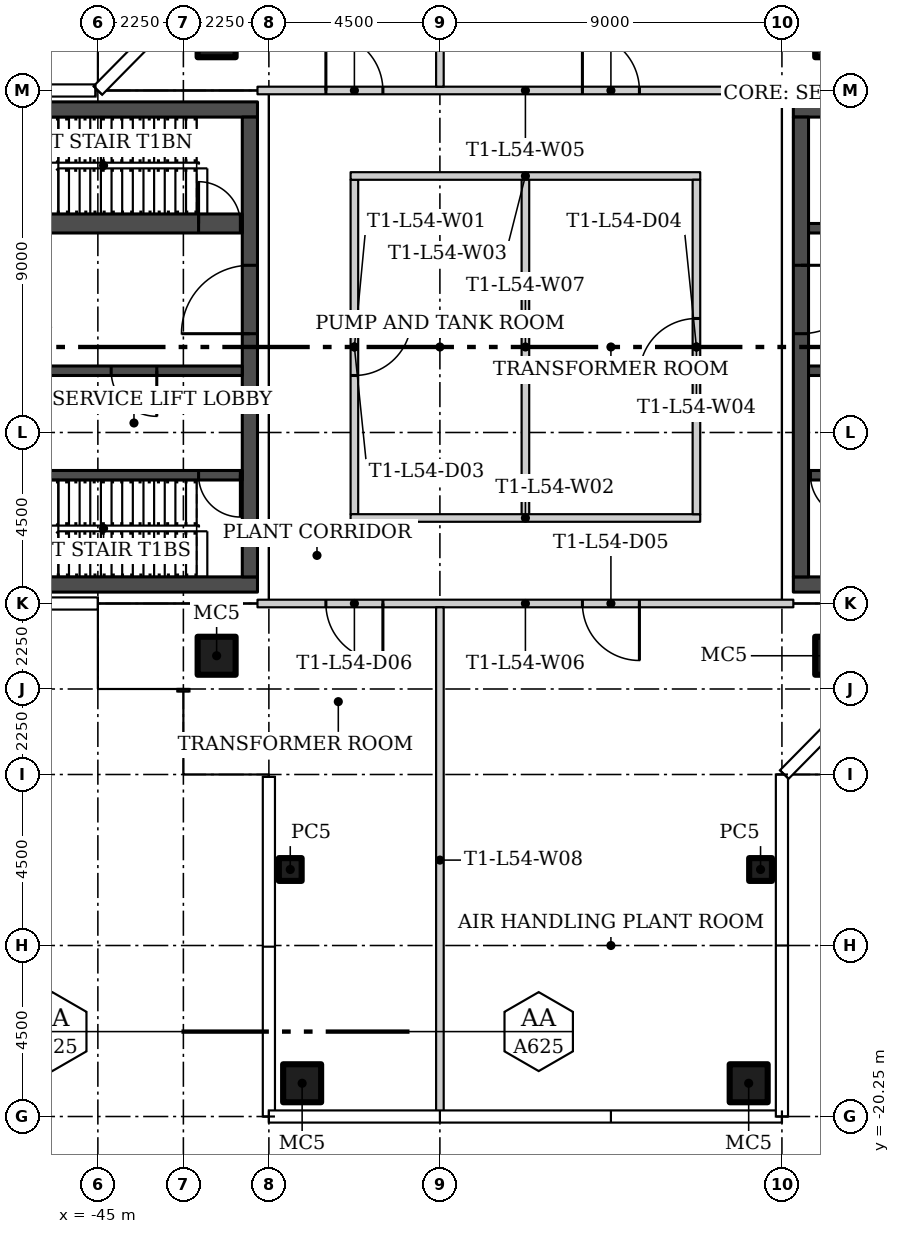
"""IFC4 building model, lengths in metres.
Left out: names, types, materials, properties, quantities, classifications, styles, units other than length and angle.
Written with IfcOpenShell. Run it as: python <this file> out.ifc"""

import sys

from ifc_helpers import new_model, si_unit, direction, frame, frame_2d, origin, origin_2d, place, context, subcontext, project, spatial, rectangle, hollow_rectangle, extrude, element, fill, save


model = new_model("IFC4")
c1 = context("Model", 3, precision=1e-05, world=origin(), true_north=direction((0.0, 1.0)))
c2 = subcontext(c1, "Body", "Model", "MODEL_VIEW")
j1 = project(units=[si_unit("LENGTHUNIT", "METRE"), si_unit("PLANEANGLEUNIT", "RADIAN")], contexts=[c1])
p1 = place(None, origin())
s1 = spatial("IfcSite", under=j1, at=p1, CompositionType="ELEMENT")
p2 = place(p1, origin())
s2 = spatial("IfcBuilding", under=s1, at=p2, CompositionType="ELEMENT")
p3 = place(p2, frame((0.0, 0.0, 225.6)))
s3 = spatial("IfcBuildingStorey", under=s2, at=p3, CompositionType="ELEMENT", Elevation=225.6)
for number, where in (
    (1, (-25.625, 8.125, 0.0)),
    (2, (-25.625, -8.125, 0.0)),
    (3, (-41.875, 8.125, 0.0)),
    (4, (-41.875, -8.125, 0.0)),
):
    element("IfcColumn", number, at=place(p3, frame(where)), inside=s3, PredefinedType="COLUMN", context=c2, shape_type="SweptSolid", body=[
        extrude(hollow_rectangle(XDim=1.0, YDim=1.0, WallThickness=0.04, at=origin_2d()), origin(), (0.0, 0.0, 1.0), 4.45),
    ])
p4 = place(p3, frame((-39.938, -13.75, 0.0)))
e5 = element("IfcColumn", 5, at=p4, inside=s3, PredefinedType="COLUMN", context=c2, shape_type="SweptSolid", body=[
    extrude(hollow_rectangle(XDim=0.6, YDim=0.6, WallThickness=0.02, at=origin_2d()), origin(), (0.0, 0.0, 1.0), 4.45),
])
p5 = place(p3, frame((-39.625, -19.375, 0.0)))
e6 = element("IfcColumn", 6, at=p5, inside=s3, PredefinedType="COLUMN", context=c2, shape_type="SweptSolid", body=[
    extrude(hollow_rectangle(XDim=1.0, YDim=1.0, WallThickness=0.04, at=origin_2d()), origin(), (0.0, 0.0, 1.0), 4.45),
])
p6 = place(p3, frame((-27.562, -13.75, 0.0)))
e7 = element("IfcColumn", 7, at=p6, inside=s3, PredefinedType="COLUMN", context=c2, shape_type="SweptSolid", body=[
    extrude(hollow_rectangle(XDim=0.6, YDim=0.6, WallThickness=0.02, at=origin_2d()), origin(), (0.0, 0.0, 1.0), 4.45),
])
p7 = place(p3, frame((-27.875, -19.375, 0.0)))
e8 = element("IfcColumn", 8, at=p7, inside=s3, PredefinedType="COLUMN", context=c2, shape_type="SweptSolid", body=[
    extrude(hollow_rectangle(XDim=1.0, YDim=1.0, WallThickness=0.04, at=origin_2d()), origin(), (0.0, 0.0, 1.0), 4.45),
])
p8 = place(p3, frame((-38.25, 4.4, 0.0), z_axis=(0.0, 0.0, 1.0), x_axis=(0.0, -1.0, 0.0)))
e9 = element("IfcWall", 9, at=p8, inside=s3, PredefinedType="PARTITIONING", context=c2, shape_type="SweptSolid", body=[
    extrude(rectangle(XDim=8.8, YDim=0.2, at=frame_2d((4.4, 0.0))), origin(), (0.0, 0.0, 1.0), 4.45),
])
p9 = place(p8, frame((3.65, 0.0, 0.0)))
e10 = element("IfcOpeningElement", 10, at=p9, cuts=e9, PredefinedType="OPENING", context=c2, shape_type="SweptSolid", body=[
    extrude(rectangle(XDim=1.5, YDim=2.4, at=frame_2d((0.75, 1.2))), frame((0.0, 0.11, 0.0), z_axis=(0.0, -1.0, 0.0), x_axis=(1.0, 0.0, 0.0)), (0.0, 0.0, 1.0), 0.22),
])
p10 = place(p3, frame((-38.35, -4.5, 0.0)))
e11 = element("IfcWall", 11, at=p10, inside=s3, PredefinedType="PARTITIONING", context=c2, shape_type="SweptSolid", body=[
    extrude(rectangle(XDim=9.2, YDim=0.2, at=frame_2d((4.6, 0.0))), origin(), (0.0, 0.0, 1.0), 4.45),
])
p11 = place(p3, frame((-29.15, 4.5, 0.0), z_axis=(0.0, 0.0, 1.0), x_axis=(-1.0, 0.0, 0.0)))
e12 = element("IfcWall", 12, at=p11, inside=s3, PredefinedType="PARTITIONING", context=c2, shape_type="SweptSolid", body=[
    extrude(rectangle(XDim=9.2, YDim=0.2, at=frame_2d((4.6, 0.0))), origin(), (0.0, 0.0, 1.0), 4.45),
])
p12 = place(p3, frame((-29.25, -4.4, 0.0), z_axis=(0.0, 0.0, 1.0), x_axis=(0.0, 1.0, 0.0)))
e13 = element("IfcWall", 13, at=p12, inside=s3, PredefinedType="PARTITIONING", context=c2, shape_type="SweptSolid", body=[
    extrude(rectangle(XDim=8.8, YDim=0.2, at=frame_2d((4.4, 0.0))), origin(), (0.0, 0.0, 1.0), 4.45),
])
p13 = place(p12, frame((3.65, 0.0, 0.0)))
e14 = element("IfcOpeningElement", 14, at=p13, cuts=e13, PredefinedType="OPENING", context=c2, shape_type="SweptSolid", body=[
    extrude(rectangle(XDim=1.5, YDim=2.4, at=frame_2d((0.75, 1.2))), frame((0.0, 0.11, 0.0), z_axis=(0.0, -1.0, 0.0), x_axis=(1.0, 0.0, 0.0)), (0.0, 0.0, 1.0), 0.22),
])
p14 = place(p3, frame((-40.8, 6.75, 0.0)))
e15 = element("IfcWall", 15, at=p14, inside=s3, PredefinedType="PARTITIONING", context=c2, shape_type="SweptSolid", body=[
    extrude(rectangle(XDim=14.1, YDim=0.2, at=frame_2d((7.05, 0.0))), origin(), (0.0, 0.0, 1.0), 4.45),
])
p15 = place(p14, frame((1.8, 0.0, 0.0)))
e16 = element("IfcOpeningElement", 16, at=p15, cuts=e15, PredefinedType="OPENING", context=c2, shape_type="SweptSolid", body=[
    extrude(rectangle(XDim=1.5, YDim=2.4, at=frame_2d((0.75, 1.2))), frame((0.0, 0.11, 0.0), z_axis=(0.0, -1.0, 0.0), x_axis=(1.0, 0.0, 0.0)), (0.0, 0.0, 1.0), 0.22),
])
p16 = place(p14, frame((8.55, 0.0, 0.0)))
e17 = element("IfcOpeningElement", 17, at=p16, cuts=e15, PredefinedType="OPENING", context=c2, shape_type="SweptSolid", body=[
    extrude(rectangle(XDim=1.5, YDim=2.4, at=frame_2d((0.75, 1.2))), frame((0.0, 0.11, 0.0), z_axis=(0.0, -1.0, 0.0), x_axis=(1.0, 0.0, 0.0)), (0.0, 0.0, 1.0), 0.22),
])
p17 = place(p3, frame((-26.7, -6.75, 0.0), z_axis=(0.0, 0.0, 1.0), x_axis=(-1.0, 0.0, 0.0)))
e18 = element("IfcWall", 18, at=p17, inside=s3, PredefinedType="PARTITIONING", context=c2, shape_type="SweptSolid", body=[
    extrude(rectangle(XDim=14.1, YDim=0.2, at=frame_2d((7.05, 0.0))), origin(), (0.0, 0.0, 1.0), 4.45),
])
p18 = place(p17, frame((4.05, 0.0, 0.0)))
e19 = element("IfcOpeningElement", 19, at=p18, cuts=e18, PredefinedType="OPENING", context=c2, shape_type="SweptSolid", body=[
    extrude(rectangle(XDim=1.5, YDim=2.4, at=frame_2d((0.75, 1.2))), frame((0.0, 0.11, 0.0), z_axis=(0.0, -1.0, 0.0), x_axis=(1.0, 0.0, 0.0)), (0.0, 0.0, 1.0), 0.22),
])
p19 = place(p17, frame((10.8, 0.0, 0.0)))
e20 = element("IfcOpeningElement", 20, at=p19, cuts=e18, PredefinedType="OPENING", context=c2, shape_type="SweptSolid", body=[
    extrude(rectangle(XDim=1.5, YDim=2.4, at=frame_2d((0.75, 1.2))), frame((0.0, 0.11, 0.0), z_axis=(0.0, -1.0, 0.0), x_axis=(1.0, 0.0, 0.0)), (0.0, 0.0, 1.0), 0.22),
])
p20 = place(p3, frame((-33.75, -4.4, 0.0), z_axis=(0.0, 0.0, 1.0), x_axis=(0.0, 1.0, 0.0)))
e21 = element("IfcWall", 21, at=p20, inside=s3, PredefinedType="PARTITIONING", context=c2, shape_type="SweptSolid", body=[
    extrude(rectangle(XDim=8.8, YDim=0.2, at=frame_2d((4.4, 0.0))), origin(), (0.0, 0.0, 1.0), 4.45),
])
p21 = place(p3, frame((-36.0, -20.155, 0.0), z_axis=(0.0, 0.0, 1.0), x_axis=(0.0, 1.0, 0.0)))
e22 = element("IfcWall", 22, at=p21, inside=s3, PredefinedType="PARTITIONING", context=c2, shape_type="SweptSolid", body=[
    extrude(rectangle(XDim=13.305, YDim=0.2, at=frame_2d((6.652, 0.0))), origin(), (0.0, 0.0, 1.0), 4.45),
])
p22 = place(p3, frame((-36.0, 6.85, 0.0), z_axis=(0.0, 0.0, 1.0), x_axis=(0.0, 1.0, 0.0)))
e23 = element("IfcWall", 23, at=p22, inside=s3, PredefinedType="PARTITIONING", context=c2, shape_type="SweptSolid", body=[
    extrude(rectangle(XDim=8.805, YDim=0.2, at=frame_2d((4.402, 0.0))), origin(), (0.0, 0.0, 1.0), 4.45),
])
for number, where in (
    (24, (-26.7, -6.25, 0.0)),
    (25, (-26.7, 6.25, 0.0)),
):
    element("IfcWall", number, at=place(p3, frame(where)), inside=s3, PredefinedType="SHEAR", context=c2, shape_type="SweptSolid", body=[
        extrude(rectangle(XDim=12.9, YDim=0.4, at=frame_2d((6.45, 0.0))), origin(), (0.0, 0.0, 1.0), 4.45),
    ])
p23 = place(p3, frame((-26.5, 6.05, 0.0), z_axis=(0.0, 0.0, 1.0), x_axis=(0.0, -1.0, 0.0)))
e26 = element("IfcWall", 26, at=p23, inside=s3, PredefinedType="SHEAR", context=c2, shape_type="SweptSolid", body=[
    extrude(rectangle(XDim=12.1, YDim=0.4, at=frame_2d((6.05, 0.0))), origin(), (0.0, 0.0, 1.0), 4.45),
])
p24 = place(p23, frame((3.9, 0.0, 0.0)))
e27 = element("IfcOpeningElement", 27, at=p24, cuts=e26, PredefinedType="OPENING", context=c2, shape_type="SweptSolid", body=[
    extrude(rectangle(XDim=1.8, YDim=2.4, at=frame_2d((0.9, 1.2))), frame((0.0, 0.21, 0.0), z_axis=(0.0, -1.0, 0.0), x_axis=(1.0, 0.0, 0.0)), (0.0, 0.0, 1.0), 0.42),
])
p25 = place(p3, frame((-14.2, -3.375, 0.0), z_axis=(0.0, 0.0, 1.0), x_axis=(-1.0, 0.0, 0.0)))
e28 = element("IfcWall", 28, at=p25, inside=s3, PredefinedType="SHEAR", context=c2, shape_type="SweptSolid", body=[
    extrude(rectangle(XDim=12.1, YDim=0.25, at=frame_2d((6.05, 0.0))), origin(), (0.0, 0.0, 1.0), 4.45),
])
p26 = place(p25, frame((10.95, 0.0, 0.0)))
e29 = element("IfcOpeningElement", 29, at=p26, cuts=e28, PredefinedType="OPENING", context=c2, shape_type="SweptSolid", body=[
    extrude(rectangle(XDim=1.1, YDim=2.1, at=frame_2d((0.55, 1.05))), frame((0.0, 0.135, 0.0), z_axis=(0.0, -1.0, 0.0), x_axis=(1.0, 0.0, 0.0)), (0.0, 0.0, 1.0), 0.27),
])
p27 = place(p3, frame((-14.2, -0.625, 0.0), z_axis=(0.0, 0.0, 1.0), x_axis=(-1.0, 0.0, 0.0)))
e30 = element("IfcWall", 30, at=p27, inside=s3, PredefinedType="SHEAR", context=c2, shape_type="SweptSolid", body=[
    extrude(rectangle(XDim=12.1, YDim=0.25, at=frame_2d((6.05, 0.0))), origin(), (0.0, 0.0, 1.0), 4.45),
])
p28 = place(p27, frame((8.65, 0.0, 0.0)))
e31 = element("IfcOpeningElement", 31, at=p28, cuts=e30, PredefinedType="OPENING", context=c2, shape_type="SweptSolid", body=[
    extrude(rectangle(XDim=1.2, YDim=2.1, at=frame_2d((0.6, 1.05))), frame((0.0, 0.135, 0.0), z_axis=(0.0, -1.0, 0.0), x_axis=(1.0, 0.0, 0.0)), (0.0, 0.0, 1.0), 0.27),
])
p29 = place(p27, frame((1.7, 0.0, 0.0)))
e32 = element("IfcOpeningElement", 32, at=p29, cuts=e30, PredefinedType="OPENING", context=c2, shape_type="SweptSolid", body=[
    extrude(rectangle(XDim=0.9, YDim=2.1, at=frame_2d((0.45, 1.05))), frame((0.0, 0.135, 0.0), z_axis=(0.0, -1.0, 0.0), x_axis=(1.0, 0.0, 0.0)), (0.0, 0.0, 1.0), 0.27),
])
p30 = place(p27, frame((0.075, 0.0, 0.0)))
e33 = element("IfcOpeningElement", 33, at=p30, cuts=e30, PredefinedType="OPENING", context=c2, shape_type="SweptSolid", body=[
    extrude(rectangle(XDim=0.9, YDim=2.1, at=frame_2d((0.45, 1.05))), frame((0.0, 0.135, 0.0), z_axis=(0.0, -1.0, 0.0), x_axis=(1.0, 0.0, 0.0)), (0.0, 0.0, 1.0), 0.27),
])
p31 = place(p3, frame((-26.3, 3.125, 0.0)))
e34 = element("IfcWall", 34, at=p31, inside=s3, PredefinedType="SHEAR", context=c2, shape_type="SweptSolid", body=[
    extrude(rectangle(XDim=12.1, YDim=0.25, at=frame_2d((6.05, 0.0))), origin(), (0.0, 0.0, 1.0), 4.45),
])
p32 = place(p31, frame((2.475, 0.0, 0.0)))
e35 = element("IfcOpeningElement", 35, at=p32, cuts=e34, PredefinedType="OPENING", context=c2, shape_type="SweptSolid", body=[
    extrude(rectangle(XDim=0.9, YDim=2.1, at=frame_2d((0.45, 1.05))), frame((0.0, 0.135, 0.0), z_axis=(0.0, -1.0, 0.0), x_axis=(1.0, 0.0, 0.0)), (0.0, 0.0, 1.0), 0.27),
])
for number, where, z_axis, x_axis in (
    (36, (-40.8, -6.25, 0.0), (0.0, 0.0, 1.0), (-1.0, 0.0, 0.0)),
    (37, (-40.8, 6.25, 0.0), (0.0, 0.0, 1.0), (-1.0, 0.0, 0.0)),
):
    element("IfcWall", number, at=place(p3, frame(where, z_axis=z_axis, x_axis=x_axis)), inside=s3, PredefinedType="SHEAR", context=c2, shape_type="SweptSolid", body=[
        extrude(rectangle(XDim=12.9, YDim=0.4, at=frame_2d((6.45, 0.0))), origin(), (0.0, 0.0, 1.0), 4.45),
    ])
p33 = place(p3, frame((-41.0, -6.05, 0.0), z_axis=(0.0, 0.0, 1.0), x_axis=(0.0, 1.0, 0.0)))
e38 = element("IfcWall", 38, at=p33, inside=s3, PredefinedType="SHEAR", context=c2, shape_type="SweptSolid", body=[
    extrude(rectangle(XDim=12.1, YDim=0.4, at=frame_2d((6.05, 0.0))), origin(), (0.0, 0.0, 1.0), 4.45),
])
p34 = place(p33, frame((6.4, 0.0, 0.0)))
e39 = element("IfcOpeningElement", 39, at=p34, cuts=e38, PredefinedType="OPENING", context=c2, shape_type="SweptSolid", body=[
    extrude(rectangle(XDim=1.8, YDim=2.4, at=frame_2d((0.9, 1.2))), frame((0.0, 0.21, 0.0), z_axis=(0.0, -1.0, 0.0), x_axis=(1.0, 0.0, 0.0)), (0.0, 0.0, 1.0), 0.42),
])
p35 = place(p3, frame((-41.2, -3.375, 0.0), z_axis=(0.0, 0.0, 1.0), x_axis=(-1.0, 0.0, 0.0)))
e40 = element("IfcWall", 40, at=p35, inside=s3, PredefinedType="SHEAR", context=c2, shape_type="SweptSolid", body=[
    extrude(rectangle(XDim=12.1, YDim=0.25, at=frame_2d((6.05, 0.0))), origin(), (0.0, 0.0, 1.0), 4.45),
])
p36 = place(p35, frame((0.05, 0.0, 0.0)))
e41 = element("IfcOpeningElement", 41, at=p36, cuts=e40, PredefinedType="OPENING", context=c2, shape_type="SweptSolid", body=[
    extrude(rectangle(XDim=1.1, YDim=2.1, at=frame_2d((0.55, 1.05))), frame((0.0, 0.135, 0.0), z_axis=(0.0, -1.0, 0.0), x_axis=(1.0, 0.0, 0.0)), (0.0, 0.0, 1.0), 0.27),
])
p37 = place(p3, frame((-41.2, -0.625, 0.0), z_axis=(0.0, 0.0, 1.0), x_axis=(-1.0, 0.0, 0.0)))
e42 = element("IfcWall", 42, at=p37, inside=s3, PredefinedType="SHEAR", context=c2, shape_type="SweptSolid", body=[
    extrude(rectangle(XDim=12.1, YDim=0.25, at=frame_2d((6.05, 0.0))), origin(), (0.0, 0.0, 1.0), 4.45),
])
p38 = place(p37, frame((2.25, 0.0, 0.0)))
e43 = element("IfcOpeningElement", 43, at=p38, cuts=e42, PredefinedType="OPENING", context=c2, shape_type="SweptSolid", body=[
    extrude(rectangle(XDim=1.2, YDim=2.1, at=frame_2d((0.6, 1.05))), frame((0.0, 0.135, 0.0), z_axis=(0.0, -1.0, 0.0), x_axis=(1.0, 0.0, 0.0)), (0.0, 0.0, 1.0), 0.27),
])
p39 = place(p37, frame((10.025, 0.0, 0.0)))
e44 = element("IfcOpeningElement", 44, at=p39, cuts=e42, PredefinedType="OPENING", context=c2, shape_type="SweptSolid", body=[
    extrude(rectangle(XDim=0.9, YDim=2.1, at=frame_2d((0.45, 1.05))), frame((0.0, 0.135, 0.0), z_axis=(0.0, -1.0, 0.0), x_axis=(1.0, 0.0, 0.0)), (0.0, 0.0, 1.0), 0.27),
])
p40 = place(p3, frame((-48.5, 3.25, 0.0)))
e45 = element("IfcWall", 45, at=p40, inside=s3, PredefinedType="SHEAR", context=c2, shape_type="SweptSolid", body=[
    extrude(rectangle(XDim=7.3, YDim=0.5, at=frame_2d((3.65, 0.0))), origin(), (0.0, 0.0, 1.0), 4.45),
])
p41 = place(p40, frame((6.15, 0.0, 0.0)))
e46 = element("IfcOpeningElement", 46, at=p41, cuts=e45, PredefinedType="OPENING", context=c2, shape_type="SweptSolid", body=[
    extrude(rectangle(XDim=1.1, YDim=2.1, at=frame_2d((0.55, 1.05))), frame((0.0, 0.26, 0.0), z_axis=(0.0, -1.0, 0.0), x_axis=(1.0, 0.0, 0.0)), (0.0, 0.0, 1.0), 0.52),
])
p42 = place(p15, origin())
e47 = element("IfcDoor", 47, at=p42, inside=s3, OperationType="DOUBLE_DOOR_SINGLE_SWING", PredefinedType="DOOR", context=c2, shape_type="SweptSolid", body=[
    extrude(rectangle(XDim=1.5, YDim=2.4, at=frame_2d((0.75, 1.2))), frame((0.0, 0.025, 0.0), z_axis=(0.0, -1.0, 0.0), x_axis=(1.0, 0.0, 0.0)), (0.0, 0.0, 1.0), 0.05),
])
fill(e16, e47)
p43 = place(p16, origin())
e48 = element("IfcDoor", 48, at=p43, inside=s3, OperationType="DOUBLE_DOOR_SINGLE_SWING", PredefinedType="DOOR", context=c2, shape_type="SweptSolid", body=[
    extrude(rectangle(XDim=1.5, YDim=2.4, at=frame_2d((0.75, 1.2))), frame((0.0, 0.025, 0.0), z_axis=(0.0, -1.0, 0.0), x_axis=(1.0, 0.0, 0.0)), (0.0, 0.0, 1.0), 0.05),
])
fill(e17, e48)
p44 = place(p9, origin())
e49 = element("IfcDoor", 49, at=p44, inside=s3, OperationType="DOUBLE_DOOR_SINGLE_SWING", PredefinedType="DOOR", context=c2, shape_type="SweptSolid", body=[
    extrude(rectangle(XDim=1.5, YDim=2.4, at=frame_2d((0.75, 1.2))), frame((0.0, 0.025, 0.0), z_axis=(0.0, -1.0, 0.0), x_axis=(1.0, 0.0, 0.0)), (0.0, 0.0, 1.0), 0.05),
])
fill(e10, e49)
p45 = place(p13, origin())
e50 = element("IfcDoor", 50, at=p45, inside=s3, OperationType="DOUBLE_DOOR_SINGLE_SWING", PredefinedType="DOOR", context=c2, shape_type="SweptSolid", body=[
    extrude(rectangle(XDim=1.5, YDim=2.4, at=frame_2d((0.75, 1.2))), frame((0.0, 0.025, 0.0), z_axis=(0.0, -1.0, 0.0), x_axis=(1.0, 0.0, 0.0)), (0.0, 0.0, 1.0), 0.05),
])
fill(e14, e50)
p46 = place(p18, origin())
e51 = element("IfcDoor", 51, at=p46, inside=s3, OperationType="DOUBLE_DOOR_SINGLE_SWING", PredefinedType="DOOR", context=c2, shape_type="SweptSolid", body=[
    extrude(rectangle(XDim=1.5, YDim=2.4, at=frame_2d((0.75, 1.2))), frame((0.0, 0.025, 0.0), z_axis=(0.0, -1.0, 0.0), x_axis=(1.0, 0.0, 0.0)), (0.0, 0.0, 1.0), 0.05),
])
fill(e19, e51)
p47 = place(p19, origin())
e52 = element("IfcDoor", 52, at=p47, inside=s3, OperationType="DOUBLE_DOOR_SINGLE_SWING", PredefinedType="DOOR", context=c2, shape_type="SweptSolid", body=[
    extrude(rectangle(XDim=1.5, YDim=2.4, at=frame_2d((0.75, 1.2))), frame((0.0, 0.025, 0.0), z_axis=(0.0, -1.0, 0.0), x_axis=(1.0, 0.0, 0.0)), (0.0, 0.0, 1.0), 0.05),
])
fill(e20, e52)
p48 = place(p24, origin())
e53 = element("IfcDoor", 53, at=p48, inside=s3, OperationType="DOUBLE_DOOR_SINGLE_SWING", PredefinedType="DOOR", context=c2, shape_type="SweptSolid", body=[
    extrude(rectangle(XDim=1.8, YDim=2.4, at=frame_2d((0.9, 1.2))), frame((0.0, 0.025, 0.0), z_axis=(0.0, -1.0, 0.0), x_axis=(1.0, 0.0, 0.0)), (0.0, 0.0, 1.0), 0.05),
])
fill(e27, e53)
p49 = place(p26, origin())
e54 = element("IfcDoor", 54, at=p49, inside=s3, OperationType="SINGLE_SWING_RIGHT", PredefinedType="DOOR", context=c2, shape_type="SweptSolid", body=[
    extrude(rectangle(XDim=1.1, YDim=2.1, at=frame_2d((0.55, 1.05))), frame((0.0, 0.025, 0.0), z_axis=(0.0, -1.0, 0.0), x_axis=(1.0, 0.0, 0.0)), (0.0, 0.0, 1.0), 0.05),
])
fill(e29, e54)
p50 = place(p34, origin())
e55 = element("IfcDoor", 55, at=p50, inside=s3, OperationType="DOUBLE_DOOR_SINGLE_SWING", PredefinedType="DOOR", context=c2, shape_type="SweptSolid", body=[
    extrude(rectangle(XDim=1.8, YDim=2.4, at=frame_2d((0.9, 1.2))), frame((0.0, 0.025, 0.0), z_axis=(0.0, -1.0, 0.0), x_axis=(1.0, 0.0, 0.0)), (0.0, 0.0, 1.0), 0.05),
])
fill(e39, e55)
p51 = place(p36, origin())
e56 = element("IfcDoor", 56, at=p51, inside=s3, OperationType="SINGLE_SWING_LEFT", PredefinedType="DOOR", context=c2, shape_type="SweptSolid", body=[
    extrude(rectangle(XDim=1.1, YDim=2.1, at=frame_2d((0.55, 1.05))), frame((0.0, 0.025, 0.0), z_axis=(0.0, -1.0, 0.0), x_axis=(1.0, 0.0, 0.0)), (0.0, 0.0, 1.0), 0.05),
])
fill(e41, e56)
p52 = place(p38, origin())
e57 = element("IfcDoor", 57, at=p52, inside=s3, OperationType="SINGLE_SWING_LEFT", PredefinedType="DOOR", context=c2, shape_type="SweptSolid", body=[
    extrude(rectangle(XDim=1.2, YDim=2.1, at=frame_2d((0.6, 1.05))), frame((0.0, 0.025, 0.0), z_axis=(0.0, -1.0, 0.0), x_axis=(1.0, 0.0, 0.0)), (0.0, 0.0, 1.0), 0.05),
])
fill(e43, e57)
p53 = place(p41, origin())
e58 = element("IfcDoor", 58, at=p53, inside=s3, OperationType="SINGLE_SWING_RIGHT", PredefinedType="DOOR", context=c2, shape_type="SweptSolid", body=[
    extrude(rectangle(XDim=1.1, YDim=2.1, at=frame_2d((0.55, 1.05))), frame((0.0, 0.025, 0.0), z_axis=(0.0, -1.0, 0.0), x_axis=(1.0, 0.0, 0.0)), (0.0, 0.0, 1.0), 0.05),
])
fill(e46, e58)
save(model, sys.argv[1])
